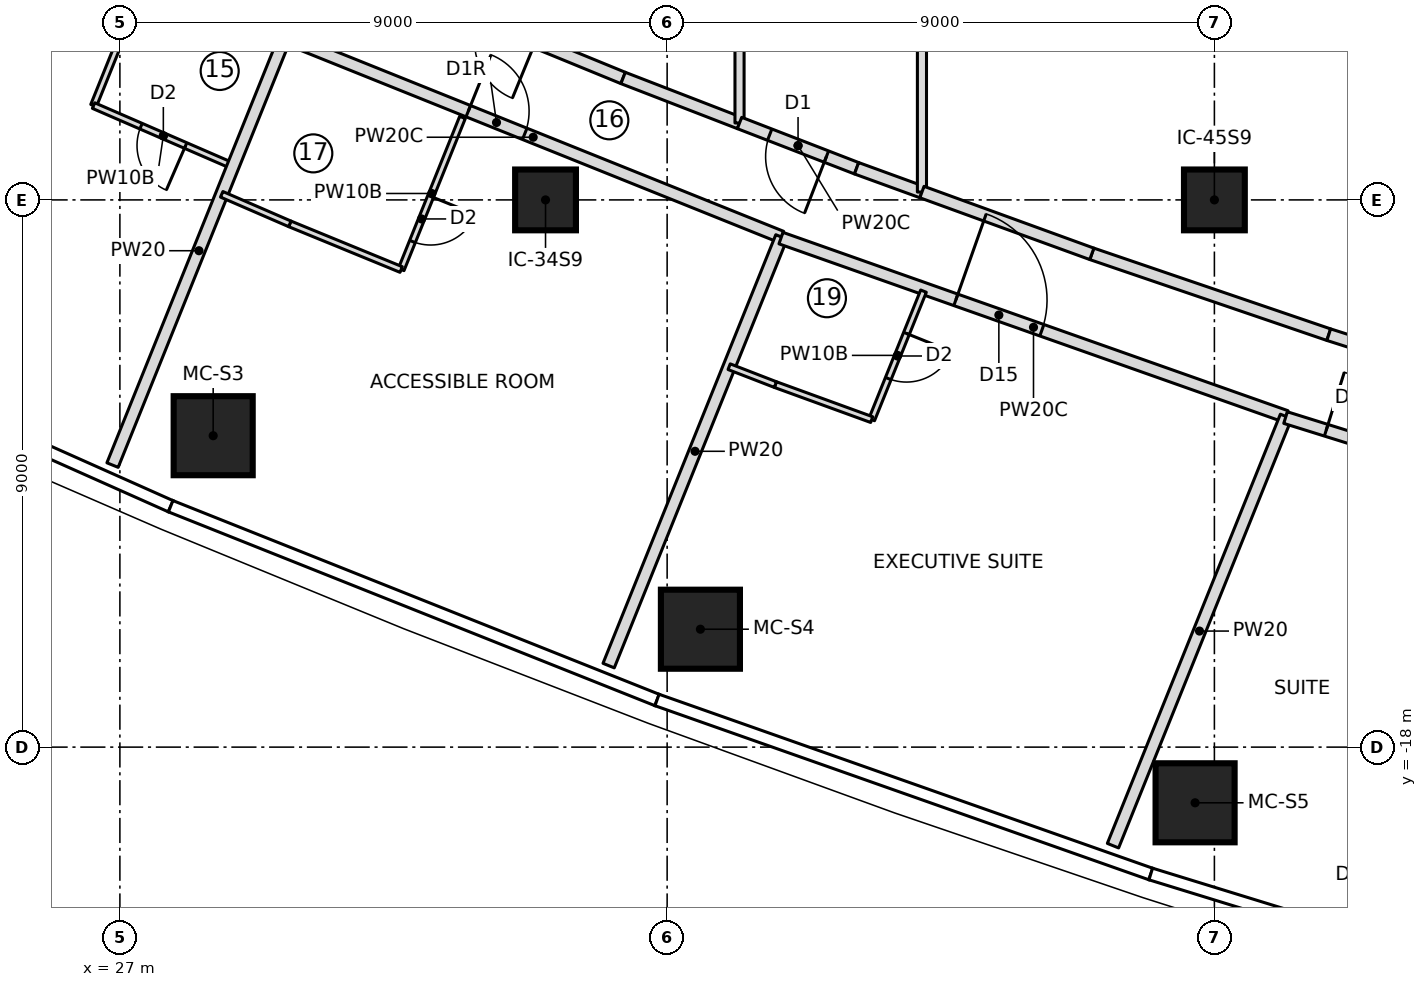
"""IFC4 building model, lengths in metres.
Left out: names, types, materials, properties, quantities, classifications, styles, units other than length and angle.
Written with IfcOpenShell. Run it as: python <this file> out.ifc"""

import sys

from ifc_helpers import new_model, si_unit, direction, frame, frame_2d, origin, origin_2d, place, context, subcontext, project, spatial, rectangle, extrude, element, fill, save


model = new_model("IFC4")
c1 = context("Model", 3, precision=1e-05, world=origin(), true_north=direction((0.0, 1.0)))
c2 = subcontext(c1, "Body", "Model", "MODEL_VIEW")
j1 = project(units=[si_unit("LENGTHUNIT", "METRE"), si_unit("PLANEANGLEUNIT", "RADIAN")], contexts=[c1])
p1 = place(None, origin())
s1 = spatial("IfcSite", under=j1, at=p1, CompositionType="ELEMENT")
p2 = place(p1, origin())
s2 = spatial("IfcBuilding", under=s1, at=p2, CompositionType="ELEMENT")
p3 = place(p2, frame((0.0, 0.0, 196.8)))
s3 = spatial("IfcBuildingStorey", under=s2, at=p3, CompositionType="ELEMENT", Elevation=196.8)
for number, where, z_axis, x_axis in (
    (1, (28.534, -12.878, 0.0), (0.0, 0.0, 1.0), (1.0, 0.0, 0.0)),
    (2, (36.547, -16.061, 0.0), (0.0, 0.0, 1.0), (1.0, 0.0, 0.0)),
    (3, (44.683, -18.916, 0.0), (0.0, 0.0, 1.0), (1.0, 0.0, 0.0)),
):
    element("IfcColumn", number, at=place(p3, frame(where, z_axis=z_axis, x_axis=x_axis)), inside=s3, PredefinedType="COLUMN", context=c2, shape_type="SweptSolid", body=[
        extrude(rectangle(XDim=1.3, YDim=1.3, at=origin_2d()), origin(), (0.0, 0.0, 1.0), 3.55),
    ])
for number, where, z_axis, x_axis in (
    (4, (34.0, -9.0, 0.0), (0.0, 0.0, 1.0), (1.0, 0.0, 0.0)),
    (5, (45.0, -9.0, 0.0), (0.0, 0.0, 1.0), (1.0, 0.0, 0.0)),
):
    element("IfcColumn", number, at=place(p3, frame(where, z_axis=z_axis, x_axis=x_axis)), inside=s3, PredefinedType="COLUMN", context=c2, shape_type="SweptSolid", body=[
        extrude(rectangle(XDim=1.0, YDim=1.0, at=origin_2d()), origin(), (0.0, 0.0, 1.0), 3.55),
    ])
p4 = place(p3, frame((26.567, -7.449, 0.0), z_axis=(0.0, 0.0, 1.0), x_axis=(0.373957926662, 0.927445669075, 0.0)))
e6 = element("IfcWall", 6, at=p4, inside=s3, PredefinedType="PARTITIONING", context=c2, shape_type="SweptSolid", body=[
    extrude(rectangle(XDim=2.278, YDim=0.1, at=frame_2d((1.139, 0.0))), origin(), (0.0, 0.0, 1.0), 3.25),
])
p5 = place(p3, frame((28.861, -8.444, 0.0), z_axis=(0.0, 0.0, 1.0), x_axis=(-0.917363173809, 0.398051262199, 0.0)))
e7 = element("IfcWall", 7, at=p5, inside=s3, PredefinedType="PARTITIONING", context=c2, shape_type="SweptSolid", body=[
    extrude(rectangle(XDim=2.5, YDim=0.1, at=frame_2d((1.25, 0.0))), origin(), (0.0, 0.0, 1.0), 3.25),
])
p6 = place(p5, frame((0.85, 0.0, 0.0)))
e8 = element("IfcOpeningElement", 8, at=p6, cuts=e7, PredefinedType="OPENING", context=c2, shape_type="SweptSolid", body=[
    extrude(rectangle(XDim=0.8, YDim=2.1, at=frame_2d((0.4, 1.05))), frame((0.0, 0.06, 0.0), z_axis=(0.0, -1.0, 0.0), x_axis=(1.0, 0.0, 0.0)), (0.0, 0.0, 1.0), 0.12),
])
p7 = place(p3, frame((26.879, -13.361, 0.0), z_axis=(0.0, 0.0, 1.0), x_axis=(0.37388636046, 0.927474522271, 0.0)))
e9 = element("IfcWall", 9, at=p7, inside=s3, PredefinedType="PARTITIONING", context=c2, shape_type="SweptSolid", body=[
    extrude(rectangle(XDim=7.603, YDim=0.2, at=frame_2d((3.801, 0.0))), origin(), (0.0, 0.0, 1.0), 3.25),
])
p8 = place(p3, frame((29.714, -6.329, 0.0), z_axis=(0.0, 0.0, 1.0), x_axis=(0.927886226391, -0.372863448026, 0.0)))
e10 = element("IfcWall", 10, at=p8, inside=s3, PredefinedType="PARTITIONING", context=c2, shape_type="SweptSolid", body=[
    extrude(rectangle(XDim=8.8, YDim=0.2, at=frame_2d((4.4, 0.0))), origin(), (0.0, 0.0, 1.0), 3.25),
])
p9 = place(p8, frame((3.25, 0.0, 0.0)))
e11 = element("IfcOpeningElement", 11, at=p9, cuts=e10, PredefinedType="OPENING", context=c2, shape_type="SweptSolid", body=[
    extrude(rectangle(XDim=1.0, YDim=2.1, at=frame_2d((0.5, 1.05))), frame((0.0, 0.11, 0.0), z_axis=(0.0, -1.0, 0.0), x_axis=(1.0, 0.0, 0.0)), (0.0, 0.0, 1.0), 0.22),
])
p10 = place(p3, frame((32.635, -7.644, 0.0), z_axis=(0.0, 0.0, 1.0), x_axis=(-0.373933172856, -0.927455649742, 0.0)))
e12 = element("IfcWall", 12, at=p10, inside=s3, PredefinedType="PARTITIONING", context=c2, shape_type="SweptSolid", body=[
    extrude(rectangle(XDim=2.697, YDim=0.1, at=frame_2d((1.349, 0.0))), origin(), (0.0, 0.0, 1.0), 3.25),
])
p11 = place(p10, frame((1.4, 0.0, 0.0)))
e13 = element("IfcOpeningElement", 13, at=p11, cuts=e12, PredefinedType="OPENING", context=c2, shape_type="SweptSolid", body=[
    extrude(rectangle(XDim=0.8, YDim=2.1, at=frame_2d((0.4, 1.05))), frame((0.0, 0.06, 0.0), z_axis=(0.0, -1.0, 0.0), x_axis=(1.0, 0.0, 0.0)), (0.0, 0.0, 1.0), 0.12),
])
p12 = place(p3, frame((31.626, -10.145, 0.0), z_axis=(0.0, 0.0, 1.0), x_axis=(-0.925208599746, 0.379458887043, 0.0)))
e14 = element("IfcWall", 14, at=p12, inside=s3, PredefinedType="PARTITIONING", context=c2, shape_type="SweptSolid", body=[
    extrude(rectangle(XDim=1.979, YDim=0.1, at=frame_2d((0.99, 0.0))), origin(), (0.0, 0.0, 1.0), 3.25),
])
p13 = place(p3, frame((29.795, -9.394, 0.0), z_axis=(0.0, 0.0, 1.0), x_axis=(-0.917378066425, 0.398016938386, 0.0)))
e15 = element("IfcWall", 15, at=p13, inside=s3, PredefinedType="PARTITIONING", context=c2, shape_type="SweptSolid", body=[
    extrude(rectangle(XDim=1.221, YDim=0.1, at=frame_2d((0.611, 0.0))), origin(), (0.0, 0.0, 1.0), 3.25),
])
p14 = place(p3, frame((35.038, -16.659, 0.0), z_axis=(0.0, 0.0, 1.0), x_axis=(0.373892577014, 0.927472016211, 0.0)))
e16 = element("IfcWall", 16, at=p14, inside=s3, PredefinedType="PARTITIONING", context=c2, shape_type="SweptSolid", body=[
    extrude(rectangle(XDim=7.601, YDim=0.2, at=frame_2d((3.8, 0.0))), origin(), (0.0, 0.0, 1.0), 3.25),
])
p15 = place(p3, frame((37.872, -9.628, 0.0), z_axis=(0.0, 0.0, 1.0), x_axis=(0.9429299378, -0.332991189675, 0.0)))
e17 = element("IfcWall", 17, at=p15, inside=s3, PredefinedType="PARTITIONING", context=c2, shape_type="SweptSolid", body=[
    extrude(rectangle(XDim=8.808, YDim=0.2, at=frame_2d((4.404, 0.0))), origin(), (0.0, 0.0, 1.0), 3.25),
])
p16 = place(p15, frame((3.05, 0.0, 0.0)))
e18 = element("IfcOpeningElement", 18, at=p16, cuts=e17, PredefinedType="OPENING", context=c2, shape_type="SweptSolid", body=[
    extrude(rectangle(XDim=1.5, YDim=2.1, at=frame_2d((0.75, 1.05))), frame((0.0, 0.11, 0.0), z_axis=(0.0, -1.0, 0.0), x_axis=(1.0, 0.0, 0.0)), (0.0, 0.0, 1.0), 0.22),
])
p17 = place(p3, frame((40.216, -10.5, 0.0), z_axis=(0.0, 0.0, 1.0), x_axis=(-0.373883593317, -0.927475637765, 0.0)))
e19 = element("IfcWall", 19, at=p17, inside=s3, PredefinedType="PARTITIONING", context=c2, shape_type="SweptSolid", body=[
    extrude(rectangle(XDim=2.278, YDim=0.1, at=frame_2d((1.139, 0.0))), origin(), (0.0, 0.0, 1.0), 3.25),
])
p18 = place(p17, frame((0.75, 0.0, 0.0)))
e20 = element("IfcOpeningElement", 20, at=p18, cuts=e19, PredefinedType="OPENING", context=c2, shape_type="SweptSolid", body=[
    extrude(rectangle(XDim=0.8, YDim=2.1, at=frame_2d((0.4, 1.05))), frame((0.0, 0.06, 0.0), z_axis=(0.0, -1.0, 0.0), x_axis=(1.0, 0.0, 0.0)), (0.0, 0.0, 1.0), 0.12),
])
p19 = place(p3, frame((39.364, -12.614, 0.0), z_axis=(0.0, 0.0, 1.0), x_axis=(-0.939759586286, 0.341836101053, 0.0)))
e21 = element("IfcWall", 21, at=p19, inside=s3, PredefinedType="PARTITIONING", context=c2, shape_type="SweptSolid", body=[
    extrude(rectangle(XDim=1.686, YDim=0.1, at=frame_2d((0.843, 0.0))), origin(), (0.0, 0.0, 1.0), 3.25),
])
p20 = place(p3, frame((37.78, -12.037, 0.0), z_axis=(0.0, 0.0, 1.0), x_axis=(-0.9326493613, 0.360784102846, 0.0)))
e22 = element("IfcWall", 22, at=p20, inside=s3, PredefinedType="PARTITIONING", context=c2, shape_type="SweptSolid", body=[
    extrude(rectangle(XDim=0.815, YDim=0.1, at=frame_2d((0.408, 0.0))), origin(), (0.0, 0.0, 1.0), 3.25),
])
p21 = place(p3, frame((43.332, -19.621, 0.0), z_axis=(0.0, 0.0, 1.0), x_axis=(0.373905590149, 0.927466770108, 0.0)))
e23 = element("IfcWall", 23, at=p21, inside=s3, PredefinedType="PARTITIONING", context=c2, shape_type="SweptSolid", body=[
    extrude(rectangle(XDim=7.611, YDim=0.2, at=frame_2d((3.806, 0.0))), origin(), (0.0, 0.0, 1.0), 3.25),
])
p22 = place(p3, frame((35.276, -6.994, 0.0), z_axis=(0.0, 0.0, 1.0), x_axis=(-0.92520652337, 0.379463949689, 0.0)))
e24 = element("IfcWall", 24, at=p22, inside=s3, PredefinedType="PARTITIONING", context=c2, shape_type="SweptSolid", body=[
    extrude(rectangle(XDim=4.117, YDim=0.2, at=frame_2d((2.059, 0.0))), origin(), (0.0, 0.0, 1.0), 3.25),
])
p23 = place(p22, frame((1.559, 0.0, 0.0)))
e25 = element("IfcOpeningElement", 25, at=p23, cuts=e24, PredefinedType="OPENING", context=c2, shape_type="SweptSolid", body=[
    extrude(rectangle(XDim=1.0, YDim=2.1, at=frame_2d((0.5, 1.05))), frame((0.0, 0.11, 0.0), z_axis=(0.0, -1.0, 0.0), x_axis=(1.0, 0.0, 0.0)), (0.0, 0.0, 1.0), 0.22),
])
p24 = place(p3, frame((37.19, -7.735, 0.0), z_axis=(0.0, 0.0, 1.0), x_axis=(-0.932688150298, 0.360683814848, 0.0)))
e26 = element("IfcWall", 26, at=p24, inside=s3, PredefinedType="PARTITIONING", context=c2, shape_type="SweptSolid", body=[
    extrude(rectangle(XDim=2.053, YDim=0.2, at=frame_2d((1.026, 0.0))), origin(), (0.0, 0.0, 1.0), 3.25),
])
p25 = place(p3, frame((37.19, -7.735, 0.0), z_axis=(0.0, 0.0, 1.0), x_axis=(0.0, 1.0, 0.0)))
e27 = element("IfcWall", 27, at=p25, inside=s3, PredefinedType="PARTITIONING", context=c2, shape_type="SweptSolid", body=[
    extrude(rectangle(XDim=15.47, YDim=0.15, at=frame_2d((7.735, 0.0))), origin(), (0.0, 0.0, 1.0), 3.25),
])
p26 = place(p3, frame((39.115, -8.479, 0.0), z_axis=(0.0, 0.0, 1.0), x_axis=(-0.9326579855, 0.360761807961, 0.0)))
e28 = element("IfcWall", 28, at=p26, inside=s3, PredefinedType="PARTITIONING", context=c2, shape_type="SweptSolid", body=[
    extrude(rectangle(XDim=2.064, YDim=0.2, at=frame_2d((1.032, 0.0))), origin(), (0.0, 0.0, 1.0), 3.25),
])
p27 = place(p26, frame((0.532, 0.0, 0.0)))
e29 = element("IfcOpeningElement", 29, at=p27, cuts=e28, PredefinedType="OPENING", context=c2, shape_type="SweptSolid", body=[
    extrude(rectangle(XDim=1.0, YDim=2.1, at=frame_2d((0.5, 1.05))), frame((0.0, 0.11, 0.0), z_axis=(0.0, -1.0, 0.0), x_axis=(1.0, 0.0, 0.0)), (0.0, 0.0, 1.0), 0.22),
])
p28 = place(p3, frame((40.19, -8.871, 0.0), z_axis=(0.0, 0.0, 1.0), x_axis=(-0.939731092615, 0.34191442434, 0.0)))
e30 = element("IfcWall", 30, at=p28, inside=s3, PredefinedType="PARTITIONING", context=c2, shape_type="SweptSolid", body=[
    extrude(rectangle(XDim=1.144, YDim=0.2, at=frame_2d((0.572, 0.0))), origin(), (0.0, 0.0, 1.0), 3.25),
])
p29 = place(p3, frame((40.19, -8.871, 0.0), z_axis=(0.0, 0.0, 1.0), x_axis=(0.0, 1.0, 0.0)))
e31 = element("IfcWall", 31, at=p29, inside=s3, PredefinedType="PARTITIONING", context=c2, shape_type="SweptSolid", body=[
    extrude(rectangle(XDim=17.741, YDim=0.15, at=frame_2d((8.871, 0.0))), origin(), (0.0, 0.0, 1.0), 3.25),
])
p30 = place(p3, frame((46.881, -11.217, 0.0), z_axis=(0.0, 0.0, 1.0), x_axis=(-0.946436071896, 0.322891253852, 0.0)))
e32 = element("IfcWall", 32, at=p30, inside=s3, PredefinedType="PARTITIONING", context=c2, shape_type="SweptSolid", body=[
    extrude(rectangle(XDim=4.117, YDim=0.2, at=frame_2d((2.059, 0.0))), origin(), (0.0, 0.0, 1.0), 3.25),
])
p31 = place(p3, frame((42.984, -9.887, 0.0), z_axis=(0.0, 0.0, 1.0), x_axis=(-0.939726274687, 0.341927665833, 0.0)))
e33 = element("IfcWall", 33, at=p31, inside=s3, PredefinedType="PARTITIONING", context=c2, shape_type="SweptSolid", body=[
    extrude(rectangle(XDim=2.973, YDim=0.2, at=frame_2d((1.487, 0.0))), origin(), (0.0, 0.0, 1.0), 3.25),
])
p32 = place(p3, frame((46.17, -12.58, 0.0), z_axis=(0.0, 0.0, 1.0), x_axis=(0.954639063921, -0.297765440634, 0.0)))
e34 = element("IfcWall", 34, at=p32, inside=s3, PredefinedType="PARTITIONING", context=c2, shape_type="SweptSolid", body=[
    extrude(rectangle(XDim=2.073, YDim=0.2, at=frame_2d((1.037, 0.0))), origin(), (0.0, 0.0, 1.0), 3.25),
])
p33 = place(p32, frame((0.7, 0.0, 0.0)))
e35 = element("IfcOpeningElement", 35, at=p33, cuts=e34, PredefinedType="OPENING", context=c2, shape_type="SweptSolid", body=[
    extrude(rectangle(XDim=1.0, YDim=2.1, at=frame_2d((0.5, 1.05))), frame((0.0, 0.11, 0.0), z_axis=(0.0, -1.0, 0.0), x_axis=(1.0, 0.0, 0.0)), (0.0, 0.0, 1.0), 0.22),
])
p34 = place(p3, frame((48.15, -11.621, 0.0), z_axis=(0.0, 0.0, 1.0), x_axis=(-0.952761948983, 0.303718074157, 0.0)))
e36 = element("IfcWall", 36, at=p34, inside=s3, PredefinedType="PARTITIONING", context=c2, shape_type="SweptSolid", body=[
    extrude(rectangle(XDim=1.332, YDim=0.2, at=frame_2d((0.666, 0.0))), origin(), (0.0, 0.0, 1.0), 3.25),
])
p35 = place(p6, origin())
e37 = element("IfcDoor", 37, at=p35, inside=s3, OperationType="SINGLE_SWING_LEFT", PredefinedType="DOOR", context=c2, shape_type="SweptSolid", body=[
    extrude(rectangle(XDim=0.8, YDim=2.1, at=frame_2d((0.4, 1.05))), frame((0.0, 0.025, 0.0), z_axis=(0.0, -1.0, 0.0), x_axis=(1.0, 0.0, 0.0)), (0.0, 0.0, 1.0), 0.05),
])
fill(e8, e37)
p36 = place(p11, origin())
e38 = element("IfcDoor", 38, at=p36, inside=s3, OperationType="SINGLE_SWING_LEFT", PredefinedType="DOOR", context=c2, shape_type="SweptSolid", body=[
    extrude(rectangle(XDim=0.8, YDim=2.1, at=frame_2d((0.4, 1.05))), frame((0.0, 0.025, 0.0), z_axis=(0.0, -1.0, 0.0), x_axis=(1.0, 0.0, 0.0)), (0.0, 0.0, 1.0), 0.05),
])
fill(e13, e38)
p37 = place(p9, origin())
e39 = element("IfcDoor", 39, at=p37, inside=s3, OperationType="SINGLE_SWING_RIGHT", PredefinedType="DOOR", context=c2, shape_type="SweptSolid", body=[
    extrude(rectangle(XDim=1.0, YDim=2.1, at=frame_2d((0.5, 1.05))), frame((0.0, 0.025, 0.0), z_axis=(0.0, -1.0, 0.0), x_axis=(1.0, 0.0, 0.0)), (0.0, 0.0, 1.0), 0.05),
])
fill(e11, e39)
p38 = place(p18, origin())
e40 = element("IfcDoor", 40, at=p38, inside=s3, OperationType="SINGLE_SWING_LEFT", PredefinedType="DOOR", context=c2, shape_type="SweptSolid", body=[
    extrude(rectangle(XDim=0.8, YDim=2.1, at=frame_2d((0.4, 1.05))), frame((0.0, 0.025, 0.0), z_axis=(0.0, -1.0, 0.0), x_axis=(1.0, 0.0, 0.0)), (0.0, 0.0, 1.0), 0.05),
])
fill(e20, e40)
p39 = place(p16, origin())
e41 = element("IfcDoor", 41, at=p39, inside=s3, OperationType="DOUBLE_DOOR_SINGLE_SWING", PredefinedType="DOOR", context=c2, shape_type="SweptSolid", body=[
    extrude(rectangle(XDim=1.5, YDim=2.1, at=frame_2d((0.75, 1.05))), frame((0.0, 0.025, 0.0), z_axis=(0.0, -1.0, 0.0), x_axis=(1.0, 0.0, 0.0)), (0.0, 0.0, 1.0), 0.05),
])
fill(e18, e41)
p40 = place(p33, origin())
e42 = element("IfcDoor", 42, at=p40, inside=s3, OperationType="SINGLE_SWING_RIGHT", PredefinedType="DOOR", context=c2, shape_type="SweptSolid", body=[
    extrude(rectangle(XDim=1.0, YDim=2.1, at=frame_2d((0.5, 1.05))), frame((0.0, 0.025, 0.0), z_axis=(0.0, -1.0, 0.0), x_axis=(1.0, 0.0, 0.0)), (0.0, 0.0, 1.0), 0.05),
])
fill(e35, e42)
p41 = place(p27, origin())
e43 = element("IfcDoor", 43, at=p41, inside=s3, OperationType="SINGLE_SWING_LEFT", PredefinedType="DOOR", context=c2, shape_type="SweptSolid", body=[
    extrude(rectangle(XDim=1.0, YDim=2.1, at=frame_2d((0.5, 1.05))), frame((0.0, 0.025, 0.0), z_axis=(0.0, -1.0, 0.0), x_axis=(1.0, 0.0, 0.0)), (0.0, 0.0, 1.0), 0.05),
])
fill(e29, e43)
save(model, sys.argv[1])
